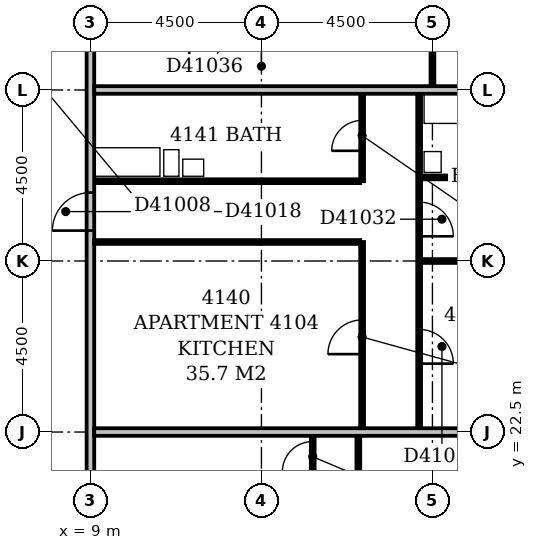
"""IFC4 building model, lengths in metres.
Left out: names, types, materials, properties, quantities, classifications, styles, units other than length and angle.
Written with IfcOpenShell. Run it as: python <this file> out.ifc"""

import sys

from ifc_helpers import new_model, si_unit, direction, frame, frame_2d, origin, place, context, subcontext, project, spatial, rectangle, extrude, element, fill, save


model = new_model("IFC4")
c1 = context("Model", 3, precision=1e-05, world=origin(), true_north=direction((0.0, 1.0)))
c2 = subcontext(c1, "Body", "Model", "MODEL_VIEW")
j1 = project(units=[si_unit("LENGTHUNIT", "METRE"), si_unit("PLANEANGLEUNIT", "RADIAN")], contexts=[c1])
p1 = place(None, origin())
s1 = spatial("IfcSite", under=j1, at=p1, CompositionType="ELEMENT")
p2 = place(p1, origin())
s2 = spatial("IfcBuilding", under=s1, at=p2, CompositionType="ELEMENT")
p3 = place(p2, frame((0.0, 0.0, 162.8)))
s3 = spatial("IfcBuildingStorey", under=s2, at=p3, CompositionType="ELEMENT", Elevation=162.8)
p4 = place(p3, frame((9.0, 5.0, 0.0), z_axis=(0.0, 0.0, 1.0), x_axis=(0.0, 1.0, 0.0)))
e1 = element("IfcWall", 1, at=p4, inside=s3, PredefinedType="PARTITIONING", context=c2, shape_type="SweptSolid", body=[
    extrude(rectangle(XDim=27.75, YDim=0.2, at=frame_2d((13.875, 0.0))), origin(), (0.0, 0.0, 1.0), 3.3),
])
p5 = place(p4, frame((22.8, 0.0, 0.0)))
e2 = element("IfcOpeningElement", 2, at=p5, cuts=e1, PredefinedType="OPENING", context=c2, shape_type="SweptSolid", body=[
    extrude(rectangle(XDim=1.0, YDim=2.1, at=frame_2d((0.5, 1.05))), frame((0.0, 0.112, 0.0), z_axis=(0.0, -1.0, 0.0), x_axis=(1.0, 0.0, 0.0)), (0.0, 0.0, 1.0), 0.224),
])
p6 = place(p4, frame((14.95, 0.0, 0.0)))
e3 = element("IfcOpeningElement", 3, at=p6, cuts=e1, PredefinedType="OPENING", context=c2, shape_type="SweptSolid", body=[
    extrude(rectangle(XDim=1.0, YDim=2.1, at=frame_2d((0.5, 1.05))), frame((0.0, 0.112, 0.0), z_axis=(0.0, -1.0, 0.0), x_axis=(1.0, 0.0, 0.0)), (0.0, 0.0, 1.0), 0.224),
])
p7 = place(p4, frame((9.3, 0.0, 0.0)))
e4 = element("IfcOpeningElement", 4, at=p7, cuts=e1, PredefinedType="OPENING", context=c2, shape_type="SweptSolid", body=[
    extrude(rectangle(XDim=1.0, YDim=2.1, at=frame_2d((0.5, 1.05))), frame((0.0, 0.112, 0.0), z_axis=(0.0, -1.0, 0.0), x_axis=(1.0, 0.0, 0.0)), (0.0, 0.0, 1.0), 0.224),
])
p8 = place(p4, frame((1.5, 0.0, 0.0)))
e5 = element("IfcOpeningElement", 5, at=p8, cuts=e1, PredefinedType="OPENING", context=c2, shape_type="SweptSolid", body=[
    extrude(rectangle(XDim=0.9, YDim=2.1, at=frame_2d((0.45, 1.05))), frame((0.0, 0.112, 0.0), z_axis=(0.0, -1.0, 0.0), x_axis=(1.0, 0.0, 0.0)), (0.0, 0.0, 1.0), 0.224),
])
p9 = place(p3, frame((16.05, 18.1, 0.0), z_axis=(0.0, 0.0, 1.0), x_axis=(0.0, 1.0, 0.0)))
e6 = element("IfcWall", 6, at=p9, inside=s3, PredefinedType="PARTITIONING", context=c2, shape_type="SweptSolid", body=[
    extrude(rectangle(XDim=4.3, YDim=0.1, at=frame_2d((2.15, 0.0))), origin(), (0.0, 0.0, 1.0), 3.3),
])
p10 = place(p9, frame((1.7, 0.0, 0.0)))
e7 = element("IfcOpeningElement", 7, at=p10, cuts=e6, PredefinedType="OPENING", context=c2, shape_type="SweptSolid", body=[
    extrude(rectangle(XDim=0.9, YDim=2.1, at=frame_2d((0.45, 1.05))), frame((0.0, 0.062, 0.0), z_axis=(0.0, -1.0, 0.0), x_axis=(1.0, 0.0, 0.0)), (0.0, 0.0, 1.0), 0.124),
])
p11 = place(p3, frame((14.85, 21.2, 0.0), z_axis=(0.0, 0.0, 1.0), x_axis=(0.0, 1.0, 0.0)))
e8 = element("IfcWall", 8, at=p11, inside=s3, PredefinedType="PARTITIONING", context=c2, shape_type="SweptSolid", body=[
    extrude(rectangle(XDim=1.2, YDim=0.1, at=frame_2d((0.6, 0.0))), origin(), (0.0, 0.0, 1.0), 3.3),
])
p12 = place(p11, frame((0.25, 0.0, 0.0)))
e9 = element("IfcOpeningElement", 9, at=p12, cuts=e8, PredefinedType="OPENING", context=c2, shape_type="SweptSolid", body=[
    extrude(rectangle(XDim=0.8, YDim=2.1, at=frame_2d((0.4, 1.05))), frame((0.0, 0.062, 0.0), z_axis=(0.0, -1.0, 0.0), x_axis=(1.0, 0.0, 0.0)), (0.0, 0.0, 1.0), 0.124),
])
p13 = place(p3, frame((9.1, 22.5, 0.0), z_axis=(0.0, 0.0, 1.0), x_axis=(1.0, 0.0, 0.0)))
e10 = element("IfcWall", 10, at=p13, inside=s3, PredefinedType="PARTITIONING", context=c2, shape_type="SweptSolid", body=[
    extrude(rectangle(XDim=12.9, YDim=0.2, at=frame_2d((6.45, 0.0))), origin(), (0.0, 0.0, 1.0), 3.3),
])
p14 = place(p3, frame((16.15, 22.6, 0.0), z_axis=(0.0, 0.0, 1.0), x_axis=(0.0, 1.0, 0.0)))
e11 = element("IfcWall", 11, at=p14, inside=s3, PredefinedType="PARTITIONING", context=c2, shape_type="SweptSolid", body=[
    extrude(rectangle(XDim=4.9, YDim=0.1, at=frame_2d((2.45, 0.0))), origin(), (0.0, 0.0, 1.0), 3.3),
])
p15 = place(p14, frame((1.95, 0.0, 0.0)))
e12 = element("IfcOpeningElement", 12, at=p15, cuts=e11, PredefinedType="OPENING", context=c2, shape_type="SweptSolid", body=[
    extrude(rectangle(XDim=0.9, YDim=2.1, at=frame_2d((0.45, 1.05))), frame((0.0, 0.062, 0.0), z_axis=(0.0, -1.0, 0.0), x_axis=(1.0, 0.0, 0.0)), (0.0, 0.0, 1.0), 0.124),
])
p16 = place(p3, frame((17.65, 22.6, 0.0), z_axis=(0.0, 0.0, 1.0), x_axis=(0.0, 1.0, 0.0)))
e13 = element("IfcWall", 13, at=p16, inside=s3, PredefinedType="PARTITIONING", context=c2, shape_type="SweptSolid", body=[
    extrude(rectangle(XDim=8.8, YDim=0.1, at=frame_2d((4.4, 0.0))), origin(), (0.0, 0.0, 1.0), 3.3),
])
p17 = place(p16, frame((1.7, 0.0, 0.0)))
e14 = element("IfcOpeningElement", 14, at=p17, cuts=e13, PredefinedType="OPENING", context=c2, shape_type="SweptSolid", body=[
    extrude(rectangle(XDim=0.9, YDim=2.1, at=frame_2d((0.45, 1.05))), frame((0.0, 0.062, 0.0), z_axis=(0.0, -1.0, 0.0), x_axis=(1.0, 0.0, 0.0)), (0.0, 0.0, 1.0), 0.124),
])
p18 = place(p16, frame((5.05, 0.0, 0.0)))
e15 = element("IfcOpeningElement", 15, at=p18, cuts=e13, PredefinedType="OPENING", context=c2, shape_type="SweptSolid", body=[
    extrude(rectangle(XDim=0.9, YDim=2.1, at=frame_2d((0.45, 1.05))), frame((0.0, 0.062, 0.0), z_axis=(0.0, -1.0, 0.0), x_axis=(1.0, 0.0, 0.0)), (0.0, 0.0, 1.0), 0.124),
])
p19 = place(p3, frame((17.7, 27.0, 0.0), z_axis=(0.0, 0.0, 1.0), x_axis=(1.0, 0.0, 0.0)))
e16 = element("IfcWall", 16, at=p19, inside=s3, PredefinedType="PARTITIONING", context=c2, shape_type="SweptSolid", body=[
    extrude(rectangle(XDim=4.3, YDim=0.1, at=frame_2d((2.15, 0.0))), origin(), (0.0, 0.0, 1.0), 2.7),
])
p20 = place(p3, frame((9.1, 27.5, 0.0), z_axis=(0.0, 0.0, 1.0), x_axis=(1.0, 0.0, 0.0)))
e17 = element("IfcWall", 17, at=p20, inside=s3, PredefinedType="PARTITIONING", context=c2, shape_type="SweptSolid", body=[
    extrude(rectangle(XDim=7.0, YDim=0.1, at=frame_2d((3.5, 0.0))), origin(), (0.0, 0.0, 1.0), 2.7),
])
p21 = place(p3, frame((9.1, 29.1, 0.0), z_axis=(0.0, 0.0, 1.0), x_axis=(1.0, 0.0, 0.0)))
e18 = element("IfcWall", 18, at=p21, inside=s3, PredefinedType="PLUMBINGWALL", context=c2, shape_type="SweptSolid", body=[
    extrude(rectangle(XDim=7.0, YDim=0.1, at=frame_2d((3.5, 0.0))), origin(), (0.0, 0.0, 1.0), 3.3),
])
p22 = place(p3, frame((16.15, 29.1, 0.0), z_axis=(0.0, 0.0, 1.0), x_axis=(0.0, 1.0, 0.0)))
e19 = element("IfcWall", 19, at=p22, inside=s3, PredefinedType="PARTITIONING", context=c2, shape_type="SweptSolid", body=[
    extrude(rectangle(XDim=2.3, YDim=0.1, at=frame_2d((1.15, 0.0))), origin(), (0.0, 0.0, 1.0), 3.3),
])
p23 = place(p22, frame((0.8, 0.0, 0.0)))
e20 = element("IfcOpeningElement", 20, at=p23, cuts=e19, PredefinedType="OPENING", context=c2, shape_type="SweptSolid", body=[
    extrude(rectangle(XDim=0.8, YDim=2.1, at=frame_2d((0.4, 1.05))), frame((0.0, 0.062, 0.0), z_axis=(0.0, -1.0, 0.0), x_axis=(1.0, 0.0, 0.0)), (0.0, 0.0, 1.0), 0.124),
])
p24 = place(p3, frame((17.7, 29.2, 0.0), z_axis=(0.0, 0.0, 1.0), x_axis=(1.0, 0.0, 0.0)))
e21 = element("IfcWall", 21, at=p24, inside=s3, PredefinedType="PLUMBINGWALL", context=c2, shape_type="SweptSolid", body=[
    extrude(rectangle(XDim=2.8, YDim=0.1, at=frame_2d((1.4, 0.0))), origin(), (0.0, 0.0, 1.0), 3.3),
])
p25 = place(p24, frame((1.0, 0.0, 0.0)))
e22 = element("IfcOpeningElement", 22, at=p25, cuts=e21, PredefinedType="OPENING", context=c2, shape_type="SweptSolid", body=[
    extrude(rectangle(XDim=0.8, YDim=2.1, at=frame_2d((0.4, 1.05))), frame((0.0, 0.062, 0.0), z_axis=(0.0, -1.0, 0.0), x_axis=(1.0, 0.0, 0.0)), (0.0, 0.0, 1.0), 0.124),
])
p26 = place(p3, frame((9.1, 31.5, 0.0), z_axis=(0.0, 0.0, 1.0), x_axis=(1.0, 0.0, 0.0)))
e23 = element("IfcWall", 23, at=p26, inside=s3, PredefinedType="PARTITIONING", context=c2, shape_type="SweptSolid", body=[
    extrude(rectangle(XDim=12.9, YDim=0.2, at=frame_2d((6.45, 0.0))), origin(), (0.0, 0.0, 1.0), 3.3),
])
p27 = place(p3, frame((18.0, 31.6, 0.0), z_axis=(0.0, 0.0, 1.0), x_axis=(0.0, 1.0, 0.0)))
e24 = element("IfcWall", 24, at=p27, inside=s3, PredefinedType="PARTITIONING", context=c2, shape_type="SweptSolid", body=[
    extrude(rectangle(XDim=4.3, YDim=0.1, at=frame_2d((2.15, 0.0))), origin(), (0.0, 0.0, 1.0), 3.3),
])
p28 = place(p27, frame((1.7, 0.0, 0.0)))
e25 = element("IfcOpeningElement", 25, at=p28, cuts=e24, PredefinedType="OPENING", context=c2, shape_type="SweptSolid", body=[
    extrude(rectangle(XDim=0.9, YDim=2.1, at=frame_2d((0.45, 1.05))), frame((0.0, 0.062, 0.0), z_axis=(0.0, -1.0, 0.0), x_axis=(1.0, 0.0, 0.0)), (0.0, 0.0, 1.0), 0.124),
])
p29 = place(p5, origin())
e26 = element("IfcDoor", 26, at=p29, inside=s3, OperationType="SINGLE_SWING_LEFT", PredefinedType="DOOR", context=c2, shape_type="SweptSolid", body=[
    extrude(rectangle(XDim=1.0, YDim=2.1, at=frame_2d((0.5, 1.05))), frame((0.0, 0.025, 0.0), z_axis=(0.0, -1.0, 0.0), x_axis=(1.0, 0.0, 0.0)), (0.0, 0.0, 1.0), 0.05),
])
fill(e2, e26)
p30 = place(p12, origin())
e27 = element("IfcDoor", 27, at=p30, inside=s3, OperationType="SINGLE_SWING_LEFT", PredefinedType="DOOR", context=c2, shape_type="SweptSolid", body=[
    extrude(rectangle(XDim=0.8, YDim=2.1, at=frame_2d((0.4, 1.05))), frame((0.0, 0.025, 0.0), z_axis=(0.0, -1.0, 0.0), x_axis=(1.0, 0.0, 0.0)), (0.0, 0.0, 1.0), 0.05),
])
fill(e9, e27)
p31 = place(p15, origin())
e28 = element("IfcDoor", 28, at=p31, inside=s3, OperationType="SINGLE_SWING_LEFT", PredefinedType="DOOR", context=c2, shape_type="SweptSolid", body=[
    extrude(rectangle(XDim=0.9, YDim=2.1, at=frame_2d((0.45, 1.05))), frame((0.0, 0.025, 0.0), z_axis=(0.0, -1.0, 0.0), x_axis=(1.0, 0.0, 0.0)), (0.0, 0.0, 1.0), 0.05),
])
fill(e12, e28)
p32 = place(p17, frame((0.9, 0.0, 0.0), z_axis=(0.0, 0.0, 1.0), x_axis=(-1.0, 0.0, 0.0)))
e29 = element("IfcDoor", 29, at=p32, inside=s3, OperationType="SINGLE_SWING_RIGHT", PredefinedType="DOOR", context=c2, shape_type="SweptSolid", body=[
    extrude(rectangle(XDim=0.9, YDim=2.1, at=frame_2d((0.45, 1.05))), frame((0.0, 0.025, 0.0), z_axis=(0.0, -1.0, 0.0), x_axis=(1.0, 0.0, 0.0)), (0.0, 0.0, 1.0), 0.05),
])
fill(e14, e29)
p33 = place(p18, frame((0.9, 0.0, 0.0), z_axis=(0.0, 0.0, 1.0), x_axis=(-1.0, 0.0, 0.0)))
e30 = element("IfcDoor", 30, at=p33, inside=s3, OperationType="SINGLE_SWING_RIGHT", PredefinedType="DOOR", context=c2, shape_type="SweptSolid", body=[
    extrude(rectangle(XDim=0.9, YDim=2.1, at=frame_2d((0.45, 1.05))), frame((0.0, 0.025, 0.0), z_axis=(0.0, -1.0, 0.0), x_axis=(1.0, 0.0, 0.0)), (0.0, 0.0, 1.0), 0.05),
])
fill(e15, e30)
p34 = place(p23, origin())
e31 = element("IfcDoor", 31, at=p34, inside=s3, OperationType="SINGLE_SWING_LEFT", PredefinedType="DOOR", context=c2, shape_type="SweptSolid", body=[
    extrude(rectangle(XDim=0.8, YDim=2.1, at=frame_2d((0.4, 1.05))), frame((0.0, 0.025, 0.0), z_axis=(0.0, -1.0, 0.0), x_axis=(1.0, 0.0, 0.0)), (0.0, 0.0, 1.0), 0.05),
])
fill(e20, e31)
save(model, sys.argv[1])
